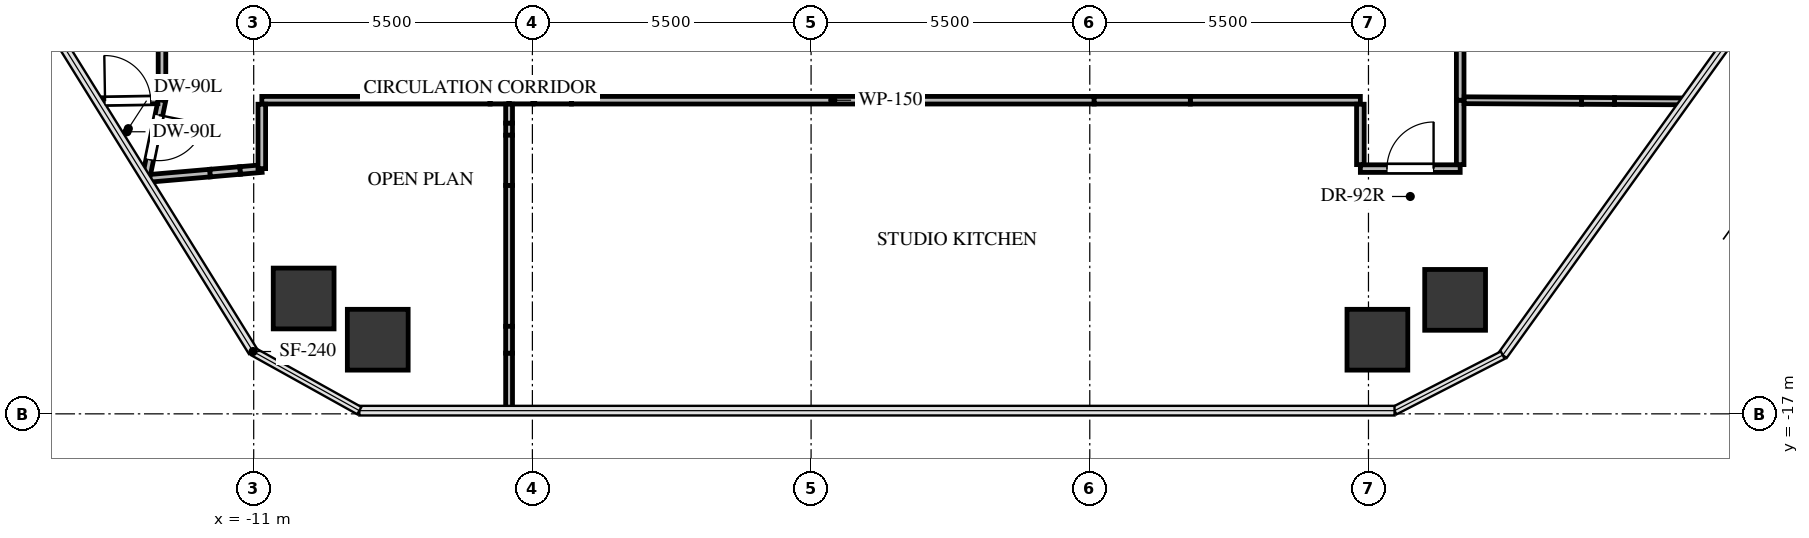
"""IFC4 building model, lengths in metres.
Left out: names, types, materials, properties, quantities, classifications, styles, units other than length and angle.
Written with IfcOpenShell. Run it as: python <this file> out.ifc"""

import sys

from ifc_helpers import new_model, si_unit, direction, frame, frame_2d, origin, origin_2d, place, context, subcontext, project, spatial, rectangle, extrude, source, transform, mapped, element, fill, save


model = new_model("IFC4")
c1 = context("Model", 3, precision=1e-05, world=origin(), true_north=direction((0.0, 1.0)))
c2 = subcontext(c1, "Body", "Model", "MODEL_VIEW")
j1 = project(units=[si_unit("LENGTHUNIT", "METRE"), si_unit("PLANEANGLEUNIT", "RADIAN")], contexts=[c1])
p1 = place(None, origin())
s1 = spatial("IfcSite", under=j1, at=p1, CompositionType="ELEMENT")
p2 = place(p1, origin())
s2 = spatial("IfcBuilding", under=s1, at=p2, CompositionType="ELEMENT")
p3 = place(p2, frame((0.0, 0.0, 137.1)))
s3 = spatial("IfcBuildingStorey", under=s2, at=p3, CompositionType="ELEMENT", Elevation=137.1)
m1 = source(origin(), c2, "Body", "SweptSolid", [
    extrude(rectangle(XDim=1.2, YDim=1.2, at=origin_2d()), origin(), (0.0, 0.0, 1.0), 3.0),
])
for number, where, z_axis, x_axis in (
    (1, (-10.014, -14.723, -0.24), (0.0, 0.0, 1.0), (1.0, 0.0, 0.0)),
    (2, (12.71, -14.75, -0.24), (0.0, 0.0, 1.0), (1.0, 0.0, 0.0)),
    (3, (11.176, -15.537, -0.24), (0.0, 0.0, 1.0), (1.0, 0.0, 0.0)),
    (4, (-8.552, -15.537, -0.24), (0.0, 0.0, 1.0), (1.0, 0.0, 0.0)),
):
    element("IfcColumn", number, at=place(p3, frame(where, z_axis=z_axis, x_axis=x_axis)), inside=s3, PredefinedType="COLUMN", context=c2, shape_type="MappedRepresentation", body=[
        mapped(m1, transform((0.0, 0.0, 0.0), x_axis=(1.0, 0.0, 0.0), y_axis=(0.0, 1.0, 0.0), z_axis=(0.0, 0.0, 1.0), scale=1.0)),
    ])
p4 = place(p3, frame((-10.84, -10.81, 0.0), z_axis=(0.0, 0.0, 1.0), x_axis=(1.0, 0.0, 0.0)))
e5 = element("IfcWall", 5, at=p4, inside=s3, PredefinedType="PARTITIONING", context=c2, shape_type="SweptSolid", body=[
    extrude(rectangle(XDim=4.506, YDim=0.15, at=frame_2d((2.253, 0.0))), origin(), (0.0, 0.0, 1.0), 1.912),
])
p5 = place(p3, frame((-6.334, -10.81, 0.0), z_axis=(0.0, 0.0, 1.0), x_axis=(1.0, 0.0, 0.0)))
e6 = element("IfcWall", 6, at=p5, inside=s3, PredefinedType="PARTITIONING", context=c2, shape_type="SweptSolid", body=[
    extrude(rectangle(XDim=0.375, YDim=0.15, at=frame_2d((0.187, 0.0))), origin(), (0.0, 0.0, 1.0), 1.912),
])
p6 = place(p3, frame((-13.129, -12.358, 0.0), z_axis=(0.0, 0.0, 1.0), x_axis=(0.996285787619, 0.086108242279, 0.0)))
e7 = element("IfcWall", 7, at=p6, inside=s3, PredefinedType="PARTITIONING", context=c2, shape_type="SweptSolid", body=[
    extrude(rectangle(XDim=1.273, YDim=0.15, at=frame_2d((0.636, 0.0))), origin(), (0.0, 0.0, 1.0), 2.745),
])
p7 = place(p3, frame((-11.27, -12.197, 0.0), z_axis=(0.0, 0.0, 1.0), x_axis=(0.996291394281, 0.086043347688, 0.0)))
e8 = element("IfcWall", 8, at=p7, inside=s3, PredefinedType="PARTITIONING", context=c2, shape_type="SweptSolid", body=[
    extrude(rectangle(XDim=0.431, YDim=0.15, at=frame_2d((0.216, 0.0))), origin(), (0.0, 0.0, 1.0), 2.745),
])
p8 = place(p3, frame((-11.861, -12.248, 0.0), z_axis=(0.0, 0.0, 1.0), x_axis=(0.996256019863, 0.086451968666, 0.0)))
e9 = element("IfcWall", 9, at=p8, inside=s3, PredefinedType="PARTITIONING", context=c2, shape_type="SweptSolid", body=[
    extrude(rectangle(XDim=0.593, YDim=0.15, at=frame_2d((0.296, 0.0))), origin(), (0.0, 0.0, 1.0), 2.08),
])
p9 = place(p3, frame((-12.81, -10.81, 0.0), z_axis=(0.0, 0.0, 1.0), x_axis=(-0.201786289638, -0.979429575474, 0.0)))
e10 = element("IfcWall", 10, at=p9, inside=s3, PredefinedType="PARTITIONING", context=c2, shape_type="SweptSolid", body=[
    extrude(rectangle(XDim=1.498, YDim=0.15, at=frame_2d((0.749, 0.0))), origin(), (0.0, 0.0, 1.0), 2.745),
])
p10 = place(p9, frame((0.299, 0.0, 0.0)))
e11 = element("IfcOpeningElement", 11, at=p10, cuts=e10, PredefinedType="OPENING", context=c2, shape_type="SweptSolid", body=[
    extrude(rectangle(XDim=0.9, YDim=2.05, at=frame_2d((0.45, 1.025))), frame((0.0, 0.085, 0.0), z_axis=(0.0, -1.0, 0.0), x_axis=(1.0, 0.0, 0.0)), (0.0, 0.0, 1.0), 0.17),
])
p11 = place(p3, frame((-10.84, -12.16, 0.0), z_axis=(0.0, 0.0, 1.0), x_axis=(0.0, 1.0, 0.0)))
e12 = element("IfcWall", 12, at=p11, inside=s3, PredefinedType="PARTITIONING", context=c2, shape_type="SweptSolid", body=[
    extrude(rectangle(XDim=1.271, YDim=0.15, at=frame_2d((0.635, 0.0))), origin(), (0.0, 0.0, 1.0), 2.745),
])
p12 = place(p3, frame((-4.729, -10.81, 0.0), z_axis=(0.0, 0.0, 1.0), x_axis=(1.0, 0.0, 0.0)))
e13 = element("IfcWall", 13, at=p12, inside=s3, PredefinedType="PARTITIONING", context=c2, shape_type="SweptSolid", body=[
    extrude(rectangle(XDim=10.316, YDim=0.15, at=frame_2d((5.158, 0.0))), origin(), (0.0, 0.0, 1.0), 1.912),
])
p13 = place(p3, frame((7.484, -10.81, 0.0), z_axis=(0.0, 0.0, 1.0), x_axis=(1.0, 0.0, 0.0)))
e14 = element("IfcWall", 14, at=p13, inside=s3, PredefinedType="PARTITIONING", context=c2, shape_type="SweptSolid", body=[
    extrude(rectangle(XDim=3.356, YDim=0.15, at=frame_2d((1.678, 0.0))), origin(), (0.0, 0.0, 1.0), 1.912),
])
p14 = place(p3, frame((-5.96, -10.81, 0.0), z_axis=(0.0, 0.0, 1.0), x_axis=(1.0, 0.0, 0.0)))
e15 = element("IfcWall", 15, at=p14, inside=s3, PredefinedType="PARTITIONING", context=c2, shape_type="SweptSolid", body=[
    extrude(rectangle(XDim=0.473, YDim=0.15, at=frame_2d((0.237, 0.0))), origin(), (0.0, 0.0, 1.0), 1.912),
])
p15 = place(p3, frame((-5.455, -10.81, 0.0), z_axis=(0.0, 0.0, 1.0), x_axis=(1.0, 0.0, 0.0)))
e16 = element("IfcWall", 16, at=p15, inside=s3, PredefinedType="PARTITIONING", context=c2, shape_type="SweptSolid", body=[
    extrude(rectangle(XDim=0.725, YDim=0.15, at=frame_2d((0.363, 0.0))), origin(), (0.0, 0.0, 1.0), 1.912),
])
p16 = place(p3, frame((5.587, -10.81, 0.0), z_axis=(0.0, 0.0, 1.0), x_axis=(1.0, 0.0, 0.0)))
e17 = element("IfcWall", 17, at=p16, inside=s3, PredefinedType="PARTITIONING", context=c2, shape_type="SweptSolid", body=[
    extrude(rectangle(XDim=1.897, YDim=0.15, at=frame_2d((0.949, 0.0))), origin(), (0.0, 0.0, 1.0), 1.912),
])
p17 = place(p3, frame((10.84, -12.16, 0.0), z_axis=(0.0, 0.0, 1.0), x_axis=(1.0, 0.0, 0.0)))
e18 = element("IfcWall", 18, at=p17, inside=s3, PredefinedType="PARTITIONING", context=c2, shape_type="SweptSolid", body=[
    extrude(rectangle(XDim=1.97, YDim=0.15, at=frame_2d((0.985, 0.0))), origin(), (0.0, 0.0, 1.0), 2.745),
])
p18 = place(p17, frame((0.525, 0.0, 0.0)))
e19 = element("IfcOpeningElement", 19, at=p18, cuts=e18, PredefinedType="OPENING", context=c2, shape_type="SweptSolid", body=[
    extrude(rectangle(XDim=0.92, YDim=2.1, at=frame_2d((0.46, 1.05))), frame((0.0, 0.085, 0.0), z_axis=(0.0, -1.0, 0.0), x_axis=(1.0, 0.0, 0.0)), (0.0, 0.0, 1.0), 0.17),
])
p19 = place(p3, frame((10.84, -10.889, 0.0), z_axis=(0.0, 0.0, 1.0), x_axis=(0.0, -1.0, 0.0)))
e20 = element("IfcWall", 20, at=p19, inside=s3, PredefinedType="PARTITIONING", context=c2, shape_type="SweptSolid", body=[
    extrude(rectangle(XDim=1.192, YDim=0.15, at=frame_2d((0.596, 0.0))), origin(), (0.0, 0.0, 1.0), 2.745),
])
p20 = place(p3, frame((12.81, -12.081, 0.0), z_axis=(0.0, 0.0, 1.0), x_axis=(0.0, 1.0, 0.0)))
e21 = element("IfcWall", 21, at=p20, inside=s3, PredefinedType="PARTITIONING", context=c2, shape_type="SweptSolid", body=[
    extrude(rectangle(XDim=1.271, YDim=0.15, at=frame_2d((0.635, 0.0))), origin(), (0.0, 0.0, 1.0), 2.745),
])
p21 = place(p3, frame((-12.81, -9.714, 0.0), z_axis=(0.0, 0.0, 1.0), x_axis=(0.0, -1.0, 0.0)))
e22 = element("IfcWall", 22, at=p21, inside=s3, PredefinedType="PARTITIONING", context=c2, shape_type="SweptSolid", body=[
    extrude(rectangle(XDim=1.004, YDim=0.15, at=frame_2d((0.502, 0.0))), origin(), (0.0, 0.0, 1.0), 2.08),
])
p22 = place(p3, frame((12.81, -10.81, 0.0), z_axis=(0.0, 0.0, 1.0), x_axis=(0.0, 1.0, 0.0)))
e23 = element("IfcWall", 23, at=p22, inside=s3, PredefinedType="PARTITIONING", context=c2, shape_type="SweptSolid", body=[
    extrude(rectangle(XDim=2.37, YDim=0.15, at=frame_2d((1.185, 0.0))), origin(), (0.0, 0.0, 1.0), 2.745),
])
p23 = place(p3, frame((-5.96, -11.261, 0.0), z_axis=(0.0, 0.0, 1.0), x_axis=(0.0, -1.0, 0.0)))
e24 = element("IfcWall", 24, at=p23, inside=s3, PredefinedType="PARTITIONING", context=c2, shape_type="SweptSolid", body=[
    extrude(rectangle(XDim=0.24, YDim=0.135, at=frame_2d((0.12, 0.0))), origin(), (0.0, 0.0, 1.0), 1.912),
])
p24 = place(p3, frame((-5.96, -12.491, 0.0), z_axis=(0.0, 0.0, 1.0), x_axis=(0.0, -1.0, 0.0)))
e25 = element("IfcWall", 25, at=p24, inside=s3, PredefinedType="PARTITIONING", context=c2, shape_type="SweptSolid", body=[
    extrude(rectangle(XDim=2.781, YDim=0.135, at=frame_2d((1.391, 0.0))), origin(), (0.0, 0.0, 1.0), 1.912),
])
p25 = place(p3, frame((-5.96, -15.802, 0.0), z_axis=(0.0, 0.0, 1.0), x_axis=(0.0, -1.0, 0.0)))
e26 = element("IfcWall", 26, at=p25, inside=s3, PredefinedType="PARTITIONING", context=c2, shape_type="SweptSolid", body=[
    extrude(rectangle(XDim=1.135, YDim=0.135, at=frame_2d((0.568, 0.0))), origin(), (0.0, 0.0, 1.0), 2.745),
])
p26 = place(p3, frame((-5.96, -10.889, 0.0), z_axis=(0.0, 0.0, 1.0), x_axis=(0.0, -1.0, 0.0)))
e27 = element("IfcWall", 27, at=p26, inside=s3, PredefinedType="PARTITIONING", context=c2, shape_type="SweptSolid", body=[
    extrude(rectangle(XDim=0.372, YDim=0.135, at=frame_2d((0.186, 0.0))), origin(), (0.0, 0.0, 1.0), 1.912),
])
p27 = place(p3, frame((-5.96, -11.501, 0.0), z_axis=(0.0, 0.0, 1.0), x_axis=(0.0, -1.0, 0.0)))
e28 = element("IfcWall", 28, at=p27, inside=s3, PredefinedType="PARTITIONING", context=c2, shape_type="SweptSolid", body=[
    extrude(rectangle(XDim=0.99, YDim=0.135, at=frame_2d((0.495, 0.0))), origin(), (0.0, 0.0, 1.0), 1.912),
])
p28 = place(p3, frame((-5.96, -15.272, 0.0), z_axis=(0.0, 0.0, 1.0), x_axis=(0.0, -1.0, 0.0)))
e29 = element("IfcWall", 29, at=p28, inside=s3, PredefinedType="PARTITIONING", context=c2, shape_type="SweptSolid", body=[
    extrude(rectangle(XDim=0.529, YDim=0.135, at=frame_2d((0.265, 0.0))), origin(), (0.0, 0.0, 1.0), 2.08),
])
p29 = place(p3, frame((-14.076, -10.831, 0.0), z_axis=(0.0, 0.0, 1.0), x_axis=(0.999860796611, 0.016684945308, 0.0)))
e30 = element("IfcWall", 30, at=p29, inside=s3, PredefinedType="PARTITIONING", context=c2, shape_type="SweptSolid", body=[
    extrude(rectangle(XDim=1.185, YDim=0.135, at=frame_2d((0.593, 0.0))), origin(), (0.0, 0.0, 1.0), 2.745),
])
p30 = place(p29, frame((0.143, 0.0, 0.0)))
e31 = element("IfcOpeningElement", 31, at=p30, cuts=e30, PredefinedType="OPENING", context=c2, shape_type="SweptSolid", body=[
    extrude(rectangle(XDim=0.9, YDim=2.05, at=frame_2d((0.45, 1.025))), frame((0.0, 0.078, 0.0), z_axis=(0.0, -1.0, 0.0), x_axis=(1.0, 0.0, 0.0)), (0.0, 0.0, 1.0), 0.155),
])
p31 = place(p3, frame((12.889, -10.81, 0.0), z_axis=(0.0, 0.0, 1.0), x_axis=(0.999986120669, -0.005268630773, 0.0)))
e32 = element("IfcWall", 32, at=p31, inside=s3, PredefinedType="PARTITIONING", context=c2, shape_type="SweptSolid", body=[
    extrude(rectangle(XDim=2.317, YDim=0.135, at=frame_2d((1.158, 0.0))), origin(), (0.0, 0.0, 1.0), 2.745),
])
p32 = place(p3, frame((15.855, -10.826, 0.0), z_axis=(0.0, 0.0, 1.0), x_axis=(0.999986174138, -0.005258472432, 0.0)))
e33 = element("IfcWall", 33, at=p32, inside=s3, PredefinedType="PARTITIONING", context=c2, shape_type="SweptSolid", body=[
    extrude(rectangle(XDim=1.393, YDim=0.135, at=frame_2d((0.696, 0.0))), origin(), (0.0, 0.0, 1.0), 2.745),
])
p33 = place(p3, frame((15.206, -10.823, 0.0), z_axis=(0.0, 0.0, 1.0), x_axis=(0.999986139453, -0.005265064292, 0.0)))
e34 = element("IfcWall", 34, at=p33, inside=s3, PredefinedType="PARTITIONING", context=c2, shape_type="SweptSolid", body=[
    extrude(rectangle(XDim=0.649, YDim=0.135, at=frame_2d((0.325, 0.0))), origin(), (0.0, 0.0, 1.0), 2.08),
])
m2 = source(origin(), c2, "Body", "SweptSolid", [
    extrude(rectangle(XDim=0.9, YDim=2.05, at=frame_2d((0.45, 1.025))), frame((0.0, 0.025, 0.0), z_axis=(0.0, -1.0, 0.0), x_axis=(1.0, 0.0, 0.0)), (0.0, 0.0, 1.0), 0.05),
])
p34 = place(p10, origin())
e35 = element("IfcDoor", 35, at=p34, inside=s3, OperationType="SINGLE_SWING_LEFT", PredefinedType="DOOR", context=c2, shape_type="MappedRepresentation", body=[
    mapped(m2, transform((0.0, 0.0, 0.0), x_axis=(1.0, 0.0, 0.0), y_axis=(0.0, 1.0, 0.0), z_axis=(0.0, 0.0, 1.0), scale=1.0)),
])
fill(e11, e35)
m3 = source(origin(), c2, "Body", "SweptSolid", [
    extrude(rectangle(XDim=0.92, YDim=2.1, at=frame_2d((0.46, 1.05))), frame((0.0, 0.025, 0.0), z_axis=(0.0, -1.0, 0.0), x_axis=(1.0, 0.0, 0.0)), (0.0, 0.0, 1.0), 0.05),
])
p35 = place(p18, origin())
e36 = element("IfcDoor", 36, at=p35, inside=s3, OperationType="SINGLE_SWING_RIGHT", PredefinedType="DOOR", context=c2, shape_type="MappedRepresentation", body=[
    mapped(m3, transform((0.0, 0.0, 0.0), x_axis=(1.0, 0.0, 0.0), y_axis=(0.0, 1.0, 0.0), z_axis=(0.0, 0.0, 1.0), scale=1.0)),
])
fill(e19, e36)
p36 = place(p30, origin())
e37 = element("IfcDoor", 37, at=p36, inside=s3, OperationType="SINGLE_SWING_LEFT", PredefinedType="DOOR", context=c2, shape_type="MappedRepresentation", body=[
    mapped(m2, transform((0.0, 0.0, 0.0), x_axis=(1.0, 0.0, 0.0), y_axis=(0.0, 1.0, 0.0), z_axis=(0.0, 0.0, 1.0), scale=1.0)),
])
fill(e31, e37)
save(model, sys.argv[1])
